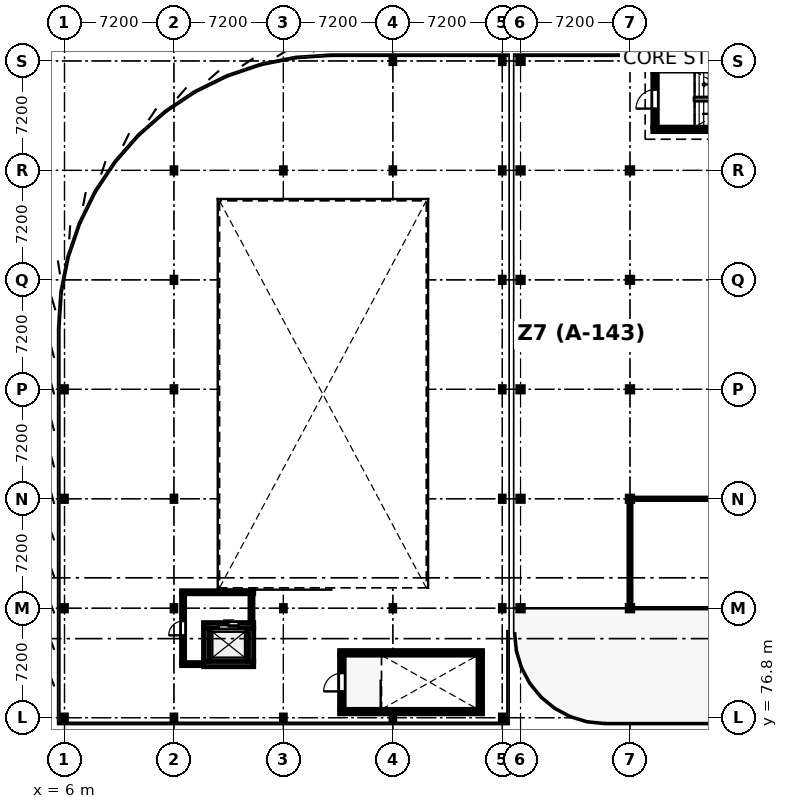
"""IFC4 building model, lengths in metres.
Left out: names, types, materials, properties, quantities, classifications, styles, units other than length and angle.
Written with IfcOpenShell. Run it as: python <this file> out.ifc"""

import sys

from ifc_helpers import new_model, si_unit, direction, frame, frame_2d, origin, origin_2d, place, context, subcontext, project, spatial, rectangle, i_section, extrude, element, fill, save


model = new_model("IFC4")
c1 = context("Model", 3, precision=1e-05, world=origin(), true_north=direction((0.0, 1.0)))
c2 = subcontext(c1, "Body", "Model", "MODEL_VIEW")
j1 = project(units=[si_unit("LENGTHUNIT", "METRE"), si_unit("PLANEANGLEUNIT", "RADIAN")], contexts=[c1])
p1 = place(None, origin())
s1 = spatial("IfcSite", under=j1, at=p1, CompositionType="ELEMENT")
p2 = place(p1, origin())
s2 = spatial("IfcBuilding", under=s1, at=p2, CompositionType="ELEMENT")
p3 = place(p2, frame((0.0, 0.0, 17.1)))
s3 = spatial("IfcBuildingStorey", under=s2, at=p3, CompositionType="ELEMENT", Elevation=17.1)
p4 = place(p3, frame((6.0, 76.8, 0.0), z_axis=(0.0, 0.0, 1.0), x_axis=(1.0, 0.0, 0.0)))
e1 = element("IfcColumn", 1, at=p4, inside=s3, PredefinedType="COLUMN", context=c2, shape_type="SweptSolid", body=[
    extrude(i_section(OverallWidth=0.257, OverallDepth=0.363, WebThickness=0.013, FlangeThickness=0.022, FilletRadius=0.015, at=origin_2d()), origin(), (0.0, 0.0, 1.0), 4.944),
])
for number, where, z_axis, x_axis in (
    (2, (6.0, 84.0, 0.0), (0.0, 0.0, 1.0), (1.0, 0.0, 0.0)),
    (3, (6.0, 91.2, 0.0), (0.0, 0.0, 1.0), (1.0, 0.0, 0.0)),
):
    element("IfcColumn", number, at=place(p3, frame(where, z_axis=z_axis, x_axis=x_axis)), inside=s3, PredefinedType="COLUMN", context=c2, shape_type="SweptSolid", body=[
        extrude(i_section(OverallWidth=0.257, OverallDepth=0.363, WebThickness=0.013, FlangeThickness=0.022, FilletRadius=0.015, at=origin_2d()), origin(), (0.0, 0.0, 1.0), 4.15),
    ])
p5 = place(p3, frame((6.0, 98.4, 0.0), z_axis=(0.0, 0.0, 1.0), x_axis=(1.0, 0.0, 0.0)))
e4 = element("IfcColumn", 4, at=p5, inside=s3, PredefinedType="COLUMN", context=c2, shape_type="SweptSolid", body=[
    extrude(i_section(OverallWidth=0.257, OverallDepth=0.363, WebThickness=0.013, FlangeThickness=0.022, FilletRadius=0.015, at=origin_2d()), origin(), (0.0, 0.0, 1.0), 8.4),
])
p6 = place(p3, frame((13.2, 76.8, 0.0), z_axis=(0.0, 0.0, 1.0), x_axis=(1.0, 0.0, 0.0)))
e5 = element("IfcColumn", 5, at=p6, inside=s3, PredefinedType="COLUMN", context=c2, shape_type="SweptSolid", body=[
    extrude(i_section(OverallWidth=0.257, OverallDepth=0.363, WebThickness=0.013, FlangeThickness=0.022, FilletRadius=0.015, at=origin_2d()), origin(), (0.0, 0.0, 1.0), 4.944),
])
for number, where, z_axis, x_axis in (
    (6, (13.2, 84.0, 0.0), (0.0, 0.0, 1.0), (1.0, 0.0, 0.0)),
    (7, (13.2, 91.2, 0.0), (0.0, 0.0, 1.0), (1.0, 0.0, 0.0)),
    (8, (13.2, 98.4, 0.0), (0.0, 0.0, 1.0), (1.0, 0.0, 0.0)),
    (9, (13.2, 105.6, 0.0), (0.0, 0.0, 1.0), (1.0, 0.0, 0.0)),
):
    element("IfcColumn", number, at=place(p3, frame(where, z_axis=z_axis, x_axis=x_axis)), inside=s3, PredefinedType="COLUMN", context=c2, shape_type="SweptSolid", body=[
        extrude(i_section(OverallWidth=0.257, OverallDepth=0.363, WebThickness=0.013, FlangeThickness=0.022, FilletRadius=0.015, at=origin_2d()), origin(), (0.0, 0.0, 1.0), 4.15),
    ])
p7 = place(p3, frame((13.2, 112.8, 0.0), z_axis=(0.0, 0.0, 1.0), x_axis=(1.0, 0.0, 0.0)))
e10 = element("IfcColumn", 10, at=p7, inside=s3, PredefinedType="COLUMN", context=c2, shape_type="SweptSolid", body=[
    extrude(i_section(OverallWidth=0.257, OverallDepth=0.363, WebThickness=0.013, FlangeThickness=0.022, FilletRadius=0.015, at=origin_2d()), origin(), (0.0, 0.0, 1.0), 6.096),
])
p8 = place(p3, frame((20.4, 76.8, 0.0), z_axis=(0.0, 0.0, 1.0), x_axis=(1.0, 0.0, 0.0)))
e11 = element("IfcColumn", 11, at=p8, inside=s3, PredefinedType="COLUMN", context=c2, shape_type="SweptSolid", body=[
    extrude(i_section(OverallWidth=0.257, OverallDepth=0.363, WebThickness=0.013, FlangeThickness=0.022, FilletRadius=0.015, at=origin_2d()), origin(), (0.0, 0.0, 1.0), 4.944),
])
p9 = place(p3, frame((20.4, 84.0, 0.0), z_axis=(0.0, 0.0, 1.0), x_axis=(1.0, 0.0, 0.0)))
e12 = element("IfcColumn", 12, at=p9, inside=s3, PredefinedType="COLUMN", context=c2, shape_type="SweptSolid", body=[
    extrude(i_section(OverallWidth=0.257, OverallDepth=0.363, WebThickness=0.013, FlangeThickness=0.022, FilletRadius=0.015, at=origin_2d()), origin(), (0.0, 0.0, 1.0), 4.15),
])
p10 = place(p3, frame((20.4, 112.8, 0.0), z_axis=(0.0, 0.0, 1.0), x_axis=(1.0, 0.0, 0.0)))
e13 = element("IfcColumn", 13, at=p10, inside=s3, PredefinedType="COLUMN", context=c2, shape_type="SweptSolid", body=[
    extrude(i_section(OverallWidth=0.257, OverallDepth=0.363, WebThickness=0.013, FlangeThickness=0.022, FilletRadius=0.015, at=origin_2d()), origin(), (0.0, 0.0, 1.0), 6.096),
])
p11 = place(p3, frame((27.6, 76.8, 0.0), z_axis=(0.0, 0.0, 1.0), x_axis=(1.0, 0.0, 0.0)))
e14 = element("IfcColumn", 14, at=p11, inside=s3, PredefinedType="COLUMN", context=c2, shape_type="SweptSolid", body=[
    extrude(i_section(OverallWidth=0.257, OverallDepth=0.363, WebThickness=0.013, FlangeThickness=0.022, FilletRadius=0.015, at=origin_2d()), origin(), (0.0, 0.0, 1.0), 4.944),
])
for number, where, z_axis, x_axis in (
    (15, (27.6, 84.0, 0.0), (0.0, 0.0, 1.0), (1.0, 0.0, 0.0)),
    (16, (27.6, 112.8, 0.0), (0.0, 0.0, 1.0), (1.0, 0.0, 0.0)),
):
    element("IfcColumn", number, at=place(p3, frame(where, z_axis=z_axis, x_axis=x_axis)), inside=s3, PredefinedType="COLUMN", context=c2, shape_type="SweptSolid", body=[
        extrude(i_section(OverallWidth=0.257, OverallDepth=0.363, WebThickness=0.013, FlangeThickness=0.022, FilletRadius=0.015, at=origin_2d()), origin(), (0.0, 0.0, 1.0), 4.15),
    ])
for number, where, z_axis, x_axis in (
    (17, (27.6, 120.0, 0.0), (0.0, 0.0, 1.0), (1.0, 0.0, 0.0)),
    (18, (34.8, 76.8, 0.0), (0.0, 0.0, 1.0), (1.0, 0.0, 0.0)),
):
    element("IfcColumn", number, at=place(p3, frame(where, z_axis=z_axis, x_axis=x_axis)), inside=s3, PredefinedType="COLUMN", context=c2, shape_type="SweptSolid", body=[
        extrude(i_section(OverallWidth=0.257, OverallDepth=0.363, WebThickness=0.013, FlangeThickness=0.022, FilletRadius=0.015, at=origin_2d()), origin(), (0.0, 0.0, 1.0), 4.944),
    ])
for number, where, z_axis, x_axis in (
    (19, (34.8, 84.0, 0.0), (0.0, 0.0, 1.0), (1.0, 0.0, 0.0)),
    (20, (34.8, 91.2, 0.0), (0.0, 0.0, 1.0), (1.0, 0.0, 0.0)),
    (21, (34.8, 98.4, 0.0), (0.0, 0.0, 1.0), (1.0, 0.0, 0.0)),
    (22, (34.8, 105.6, 0.0), (0.0, 0.0, 1.0), (1.0, 0.0, 0.0)),
    (23, (34.8, 112.8, 0.0), (0.0, 0.0, 1.0), (1.0, 0.0, 0.0)),
):
    element("IfcColumn", number, at=place(p3, frame(where, z_axis=z_axis, x_axis=x_axis)), inside=s3, PredefinedType="COLUMN", context=c2, shape_type="SweptSolid", body=[
        extrude(i_section(OverallWidth=0.257, OverallDepth=0.363, WebThickness=0.013, FlangeThickness=0.022, FilletRadius=0.015, at=origin_2d()), origin(), (0.0, 0.0, 1.0), 4.15),
    ])
p12 = place(p3, frame((34.8, 120.0, 0.0), z_axis=(0.0, 0.0, 1.0), x_axis=(1.0, 0.0, 0.0)))
e24 = element("IfcColumn", 24, at=p12, inside=s3, PredefinedType="COLUMN", context=c2, shape_type="SweptSolid", body=[
    extrude(i_section(OverallWidth=0.257, OverallDepth=0.363, WebThickness=0.013, FlangeThickness=0.022, FilletRadius=0.015, at=origin_2d()), origin(), (0.0, 0.0, 1.0), 4.944),
])
p13 = place(p3, frame((36.0, 84.0, 0.0), z_axis=(0.0, 0.0, 1.0), x_axis=(1.0, 0.0, 0.0)))
e25 = element("IfcColumn", 25, at=p13, inside=s3, PredefinedType="COLUMN", context=c2, shape_type="SweptSolid", body=[
    extrude(i_section(OverallWidth=0.371, OverallDepth=0.363, WebThickness=0.013, FlangeThickness=0.022, FilletRadius=0.015, at=origin_2d()), origin(), (0.0, 0.0, 1.0), 3.9),
])
for number, where, z_axis, x_axis in (
    (26, (36.0, 91.2, 0.0), (0.0, 0.0, 1.0), (1.0, 0.0, 0.0)),
    (27, (36.0, 98.4, 0.0), (0.0, 0.0, 1.0), (1.0, 0.0, 0.0)),
    (28, (36.0, 105.6, 0.0), (0.0, 0.0, 1.0), (1.0, 0.0, 0.0)),
):
    element("IfcColumn", number, at=place(p3, frame(where, z_axis=z_axis, x_axis=x_axis)), inside=s3, PredefinedType="COLUMN", context=c2, shape_type="SweptSolid", body=[
        extrude(i_section(OverallWidth=0.368, OverallDepth=0.356, WebThickness=0.011, FlangeThickness=0.018, FilletRadius=0.015, at=origin_2d()), origin(), (0.0, 0.0, 1.0), 3.9),
    ])
p14 = place(p3, frame((36.0, 112.8, 0.0), z_axis=(0.0, 0.0, 1.0), x_axis=(1.0, 0.0, 0.0)))
e29 = element("IfcColumn", 29, at=p14, inside=s3, PredefinedType="COLUMN", context=c2, shape_type="SweptSolid", body=[
    extrude(i_section(OverallWidth=0.371, OverallDepth=0.363, WebThickness=0.013, FlangeThickness=0.022, FilletRadius=0.015, at=origin_2d()), origin(), (0.0, 0.0, 1.0), 3.9),
])
p15 = place(p3, frame((36.0, 120.0, 0.0), z_axis=(0.0, 0.0, 1.0), x_axis=(1.0, 0.0, 0.0)))
e30 = element("IfcColumn", 30, at=p15, inside=s3, PredefinedType="COLUMN", context=c2, shape_type="SweptSolid", body=[
    extrude(i_section(OverallWidth=0.368, OverallDepth=0.356, WebThickness=0.011, FlangeThickness=0.018, FilletRadius=0.015, at=origin_2d()), origin(), (0.0, 0.0, 1.0), 3.9),
])
p16 = place(p3, frame((43.2, 84.0, 0.0), z_axis=(0.0, 0.0, 1.0), x_axis=(1.0, 0.0, 0.0)))
e31 = element("IfcColumn", 31, at=p16, inside=s3, PredefinedType="COLUMN", context=c2, shape_type="SweptSolid", body=[
    extrude(i_section(OverallWidth=0.371, OverallDepth=0.363, WebThickness=0.013, FlangeThickness=0.022, FilletRadius=0.015, at=origin_2d()), origin(), (0.0, 0.0, 1.0), 3.9),
])
for number, where, z_axis, x_axis in (
    (32, (43.2, 91.2, 0.0), (0.0, 0.0, 1.0), (1.0, 0.0, 0.0)),
    (33, (43.2, 98.4, 0.0), (0.0, 0.0, 1.0), (1.0, 0.0, 0.0)),
    (34, (43.2, 105.6, 0.0), (0.0, 0.0, 1.0), (1.0, 0.0, 0.0)),
):
    element("IfcColumn", number, at=place(p3, frame(where, z_axis=z_axis, x_axis=x_axis)), inside=s3, PredefinedType="COLUMN", context=c2, shape_type="SweptSolid", body=[
        extrude(i_section(OverallWidth=0.368, OverallDepth=0.356, WebThickness=0.011, FlangeThickness=0.018, FilletRadius=0.015, at=origin_2d()), origin(), (0.0, 0.0, 1.0), 3.9),
    ])
p17 = place(p3, frame((43.2, 112.8, 0.0), z_axis=(0.0, 0.0, 1.0), x_axis=(1.0, 0.0, 0.0)))
e35 = element("IfcColumn", 35, at=p17, inside=s3, PredefinedType="COLUMN", context=c2, shape_type="SweptSolid", body=[
    extrude(i_section(OverallWidth=0.371, OverallDepth=0.363, WebThickness=0.013, FlangeThickness=0.022, FilletRadius=0.015, at=origin_2d()), origin(), (0.0, 0.0, 1.0), 3.9),
])
p18 = place(p3, frame((43.2, 120.0, 0.0), z_axis=(0.0, 0.0, 1.0), x_axis=(1.0, 0.0, 0.0)))
e36 = element("IfcColumn", 36, at=p18, inside=s3, PredefinedType="COLUMN", context=c2, shape_type="SweptSolid", body=[
    extrude(i_section(OverallWidth=0.368, OverallDepth=0.356, WebThickness=0.011, FlangeThickness=0.018, FilletRadius=0.015, at=origin_2d()), origin(), (0.0, 0.0, 1.0), 3.9),
])
for number, where, z_axis, x_axis in (
    (37, (33.5, 77.2, 0.0), (0.0, 0.0, 1.0), (-1.0, 0.0, 0.0)),
    (38, (24.1, 81.06, 0.0), (0.0, 0.0, 1.0), (1.0, 0.0, 0.0)),
):
    element("IfcWall", number, at=place(p3, frame(where, z_axis=z_axis, x_axis=x_axis)), inside=s3, PredefinedType="SOLIDWALL", context=c2, shape_type="SweptSolid", body=[
        extrude(rectangle(XDim=9.4, YDim=0.3, at=frame_2d((4.7, 0.0))), origin(), (0.0, 0.0, 1.0), 3.4),
    ])
p19 = place(p3, frame((24.25, 77.35, 0.0), z_axis=(0.0, 0.0, 1.0), x_axis=(0.0, 1.0, 0.0)))
e39 = element("IfcWall", 39, at=p19, inside=s3, PredefinedType="SOLIDWALL", context=c2, shape_type="SweptSolid", body=[
    extrude(rectangle(XDim=3.56, YDim=0.3, at=frame_2d((1.78, 0.0))), origin(), (0.0, 0.0, 1.0), 3.4),
])
p20 = place(p19, frame((1.18, 0.0, 0.0)))
e40 = element("IfcOpeningElement", 40, at=p20, cuts=e39, PredefinedType="OPENING", context=c2, shape_type="SweptSolid", body=[
    extrude(rectangle(XDim=1.2, YDim=2.2, at=frame_2d((0.6, 1.1))), frame((0.0, 0.16, 0.0), z_axis=(0.0, -1.0, 0.0), x_axis=(1.0, 0.0, 0.0)), (0.0, 0.0, 1.0), 0.32),
])
p21 = place(p3, frame((33.35, 80.91, 0.0), z_axis=(0.0, 0.0, 1.0), x_axis=(0.0, -1.0, 0.0)))
e41 = element("IfcWall", 41, at=p21, inside=s3, PredefinedType="SOLIDWALL", context=c2, shape_type="SweptSolid", body=[
    extrude(rectangle(XDim=3.56, YDim=0.3, at=frame_2d((1.78, 0.0))), origin(), (0.0, 0.0, 1.0), 3.4),
])
for number, where, z_axis, x_axis in (
    (42, (54.1, 115.5, 0.0), (0.0, 0.0, 1.0), (-1.0, 0.0, 0.0)),
    (43, (44.7, 119.48, 0.0), (0.0, 0.0, 1.0), (1.0, 0.0, 0.0)),
):
    element("IfcWall", number, at=place(p3, frame(where, z_axis=z_axis, x_axis=x_axis)), inside=s3, PredefinedType="SOLIDWALL", context=c2, shape_type="SweptSolid", body=[
        extrude(rectangle(XDim=9.4, YDim=0.3, at=frame_2d((4.7, 0.0))), origin(), (0.0, 0.0, 1.0), 3.64),
    ])
p22 = place(p3, frame((44.85, 115.65, 0.0), z_axis=(0.0, 0.0, 1.0), x_axis=(0.0, 1.0, 0.0)))
e44 = element("IfcWall", 44, at=p22, inside=s3, PredefinedType="SOLIDWALL", context=c2, shape_type="SweptSolid", body=[
    extrude(rectangle(XDim=3.68, YDim=0.3, at=frame_2d((1.84, 0.0))), origin(), (0.0, 0.0, 1.0), 3.64),
])
p23 = place(p22, frame((1.215, 0.0, 0.0)))
e45 = element("IfcOpeningElement", 45, at=p23, cuts=e44, PredefinedType="OPENING", context=c2, shape_type="SweptSolid", body=[
    extrude(rectangle(XDim=1.25, YDim=2.2, at=frame_2d((0.625, 1.1))), frame((0.0, 0.16, 0.0), z_axis=(0.0, -1.0, 0.0), x_axis=(1.0, 0.0, 0.0)), (0.0, 0.0, 1.0), 0.32),
])
p24 = place(p3, frame((18.45, 80.325, 0.0), z_axis=(0.0, 0.0, 1.0), x_axis=(-1.0, 0.0, 0.0)))
e46 = element("IfcWall", 46, at=p24, inside=s3, PredefinedType="SHEAR", context=c2, shape_type="SweptSolid", body=[
    extrude(rectangle(XDim=3.3, YDim=0.35, at=frame_2d((1.65, 0.0))), origin(), (0.0, 0.0, 1.0), 3.4),
])
p25 = place(p3, frame((15.15, 82.875, 0.0), z_axis=(0.0, 0.0, 1.0), x_axis=(1.0, 0.0, 0.0)))
e47 = element("IfcWall", 47, at=p25, inside=s3, PredefinedType="SHEAR", context=c2, shape_type="SweptSolid", body=[
    extrude(rectangle(XDim=3.3, YDim=0.35, at=frame_2d((1.65, 0.0))), origin(), (0.0, 0.0, 1.0), 3.4),
])
p26 = place(p25, frame((1.0, 0.0, 0.0)))
e48 = element("IfcOpeningElement", 48, at=p26, cuts=e47, PredefinedType="OPENING", context=c2, shape_type="SweptSolid", body=[
    extrude(rectangle(XDim=1.3, YDim=2.2, at=frame_2d((0.65, 1.1))), frame((0.0, 0.185, 0.0), z_axis=(0.0, -1.0, 0.0), x_axis=(1.0, 0.0, 0.0)), (0.0, 0.0, 1.0), 0.37),
])
for number, where, z_axis, x_axis in (
    (49, (15.325, 80.5, 0.0), (0.0, 0.0, 1.0), (0.0, 1.0, 0.0)),
    (50, (18.275, 82.7, 0.0), (0.0, 0.0, 1.0), (0.0, -1.0, 0.0)),
):
    element("IfcWall", number, at=place(p3, frame(where, z_axis=z_axis, x_axis=x_axis)), inside=s3, PredefinedType="SHEAR", context=c2, shape_type="SweptSolid", body=[
        extrude(rectangle(XDim=2.2, YDim=0.35, at=frame_2d((1.1, 0.0))), origin(), (0.0, 0.0, 1.0), 3.4),
    ])
p27 = place(p3, frame((13.698, 85.05, 0.0), z_axis=(0.0, 0.0, 1.0), x_axis=(1.0, 0.0, 0.0)))
e51 = element("IfcWall", 51, at=p27, inside=s3, PredefinedType="PARTITIONING", context=c2, shape_type="SweptSolid", body=[
    extrude(rectangle(XDim=4.752, YDim=0.205, at=frame_2d((2.376, 0.0))), origin(), (0.0, 0.0, 1.0), 3.518),
])
p28 = place(p3, frame((15.148, 80.325, 0.0), z_axis=(0.0, 0.0, 1.0), x_axis=(-1.0, 0.0, 0.0)))
e52 = element("IfcWall", 52, at=p28, inside=s3, PredefinedType="PARTITIONING", context=c2, shape_type="SweptSolid", body=[
    extrude(rectangle(XDim=1.45, YDim=0.205, at=frame_2d((0.725, 0.0))), origin(), (0.0, 0.0, 1.0), 3.518),
])
p29 = place(p3, frame((13.8, 80.43, 0.0), z_axis=(0.0, 0.0, 1.0), x_axis=(0.0, 1.0, 0.0)))
e53 = element("IfcWall", 53, at=p29, inside=s3, PredefinedType="PARTITIONING", context=c2, shape_type="SweptSolid", body=[
    extrude(rectangle(XDim=4.516, YDim=0.205, at=frame_2d((2.258, 0.0))), origin(), (0.0, 0.0, 1.0), 3.518),
])
p30 = place(p29, frame((1.788, 0.0, 0.0)))
e54 = element("IfcOpeningElement", 54, at=p30, cuts=e53, PredefinedType="OPENING", context=c2, shape_type="SweptSolid", body=[
    extrude(rectangle(XDim=0.94, YDim=2.1, at=frame_2d((0.47, 1.05))), frame((0.0, 0.113, 0.0), z_axis=(0.0, -1.0, 0.0), x_axis=(1.0, 0.0, 0.0)), (0.0, 0.0, 1.0), 0.225),
])
p31 = place(p3, frame((18.3, 84.946, 0.0), z_axis=(0.0, 0.0, 1.0), x_axis=(0.0, -1.0, 0.0)))
e55 = element("IfcWall", 55, at=p31, inside=s3, PredefinedType="PARTITIONING", context=c2, shape_type="SweptSolid", body=[
    extrude(rectangle(XDim=1.894, YDim=0.205, at=frame_2d((0.947, 0.0))), origin(), (0.0, 0.0, 1.0), 3.518),
])
p32 = place(p3, frame((43.12, 91.2, 0.0), z_axis=(0.0, 0.0, 1.0), x_axis=(1.0, 0.0, 0.0)))
e56 = element("IfcWall", 56, at=p32, inside=s3, PredefinedType="PARTITIONING", context=c2, shape_type="SweptSolid", body=[
    extrude(rectangle(XDim=36.16, YDim=0.105, at=frame_2d((18.08, 0.0))), origin(), (0.0, 0.0, 1.0), 2.863),
])
p33 = place(p32, frame((17.39, 0.0, 0.0)))
e57 = element("IfcOpeningElement", 57, at=p33, cuts=e56, PredefinedType="OPENING", context=c2, shape_type="SweptSolid", body=[
    extrude(rectangle(XDim=1.38, YDim=2.1, at=frame_2d((0.69, 1.05))), frame((0.0, 0.062, 0.0), z_axis=(0.0, -1.0, 0.0), x_axis=(1.0, 0.0, 0.0)), (0.0, 0.0, 1.0), 0.125),
])
p34 = place(p32, frame((20.02, 0.0, 0.95)))
e58 = element("IfcOpeningElement", 58, at=p34, cuts=e56, PredefinedType="OPENING", context=c2, shape_type="SweptSolid", body=[
    extrude(rectangle(XDim=1.0, YDim=1.15, at=frame_2d((0.5, 0.575))), frame((0.0, 0.062, 0.0), z_axis=(0.0, -1.0, 0.0), x_axis=(1.0, 0.0, 0.0)), (0.0, 0.0, 1.0), 0.125),
])
p35 = place(p3, frame((43.2, 84.122, 0.0), z_axis=(0.0, 0.0, 1.0), x_axis=(0.0, 1.0, 0.0)))
e59 = element("IfcWall", 59, at=p35, inside=s3, PredefinedType="PARTITIONING", context=c2, shape_type="SweptSolid", body=[
    extrude(rectangle(XDim=7.024, YDim=0.145, at=frame_2d((3.512, 0.0))), origin(), (0.0, 0.0, 1.0), 2.863),
])
p36 = place(p20, origin())
e60 = element("IfcDoor", 60, at=p36, inside=s3, OperationType="SINGLE_SWING_LEFT", PredefinedType="DOOR", context=c2, shape_type="SweptSolid", body=[
    extrude(rectangle(XDim=1.2, YDim=2.2, at=frame_2d((0.6, 1.1))), frame((0.0, 0.025, 0.0), z_axis=(0.0, -1.0, 0.0), x_axis=(1.0, 0.0, 0.0)), (0.0, 0.0, 1.0), 0.05),
])
fill(e40, e60)
p37 = place(p23, origin())
e61 = element("IfcDoor", 61, at=p37, inside=s3, OperationType="SINGLE_SWING_LEFT", PredefinedType="DOOR", context=c2, shape_type="SweptSolid", body=[
    extrude(rectangle(XDim=1.25, YDim=2.2, at=frame_2d((0.625, 1.1))), frame((0.0, 0.025, 0.0), z_axis=(0.0, -1.0, 0.0), x_axis=(1.0, 0.0, 0.0)), (0.0, 0.0, 1.0), 0.05),
])
fill(e45, e61)
p38 = place(p26, origin())
e62 = element("IfcDoor", 62, at=p38, inside=s3, OperationType="DOUBLE_DOOR_SLIDING", PredefinedType="DOOR", context=c2, shape_type="SweptSolid", body=[
    extrude(rectangle(XDim=1.3, YDim=2.2, at=frame_2d((0.65, 1.1))), frame((0.0, 0.025, 0.0), z_axis=(0.0, -1.0, 0.0), x_axis=(1.0, 0.0, 0.0)), (0.0, 0.0, 1.0), 0.05),
])
fill(e48, e62)
p39 = place(p30, origin())
e63 = element("IfcDoor", 63, at=p39, inside=s3, OperationType="SINGLE_SWING_LEFT", PredefinedType="DOOR", context=c2, shape_type="SweptSolid", body=[
    extrude(rectangle(XDim=0.94, YDim=2.1, at=frame_2d((0.47, 1.05))), frame((0.0, 0.025, 0.0), z_axis=(0.0, -1.0, 0.0), x_axis=(1.0, 0.0, 0.0)), (0.0, 0.0, 1.0), 0.05),
])
fill(e54, e63)
save(model, sys.argv[1])
